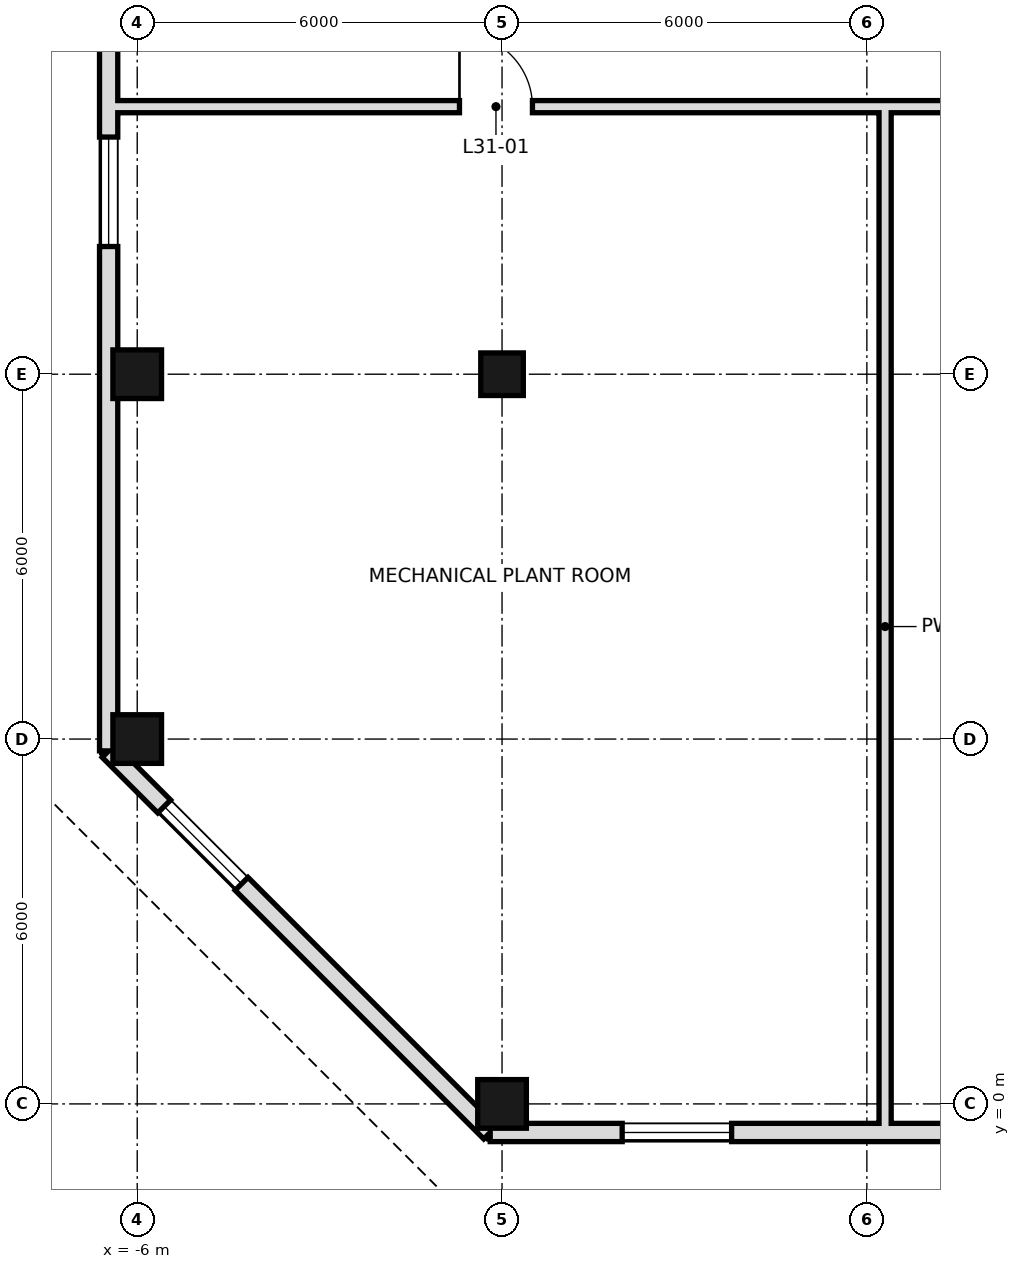
"""IFC4 building model, lengths in metres.
Left out: names, types, materials, properties, quantities, classifications, styles, units other than length and angle.
Written with IfcOpenShell. Run it as: python <this file> out.ifc"""

import sys

from ifc_helpers import new_model, si_unit, direction, frame, frame_2d, origin, origin_2d, place, context, subcontext, project, spatial, rectangle, hollow_rectangle, extrude, element, fill, save


model = new_model("IFC4")
c1 = context("Model", 3, precision=1e-05, world=origin(), true_north=direction((0.0, 1.0)))
c2 = subcontext(c1, "Body", "Model", "MODEL_VIEW")
j1 = project(units=[si_unit("LENGTHUNIT", "METRE"), si_unit("PLANEANGLEUNIT", "RADIAN")], contexts=[c1])
p1 = place(None, origin())
s1 = spatial("IfcSite", under=j1, at=p1, CompositionType="ELEMENT")
p2 = place(p1, origin())
s2 = spatial("IfcBuilding", under=s1, at=p2, CompositionType="ELEMENT")
p3 = place(p2, frame((0.0, 0.0, 138.4)))
s3 = spatial("IfcBuildingStorey", under=s2, at=p3, CompositionType="ELEMENT", Elevation=138.4)
for number, where, z_axis, x_axis in (
    (1, (-6.0, 6.0, 0.0), (0.0, 0.0, 1.0), (1.0, 0.0, 0.0)),
    (2, (-6.0, 12.0, 0.0), (0.0, 0.0, 1.0), (1.0, 0.0, 0.0)),
    (3, (0.0, 0.0, 0.0), (0.0, 0.0, 1.0), (1.0, 0.0, 0.0)),
):
    element("IfcColumn", number, at=place(p3, frame(where, z_axis=z_axis, x_axis=x_axis)), inside=s3, PredefinedType="COLUMN", context=c2, shape_type="SweptSolid", body=[
        extrude(hollow_rectangle(XDim=0.8, YDim=0.8, WallThickness=0.04, at=origin_2d()), origin(), (0.0, 0.0, 1.0), 5.4),
    ])
p4 = place(p3, frame((0.0, 12.0, 0.0), z_axis=(0.0, 0.0, 1.0), x_axis=(1.0, 0.0, 0.0)))
e4 = element("IfcColumn", 4, at=p4, inside=s3, PredefinedType="COLUMN", context=c2, shape_type="SweptSolid", body=[
    extrude(hollow_rectangle(XDim=0.7, YDim=0.7, WallThickness=0.036, at=origin_2d()), origin(), (0.0, 0.0, 1.0), 5.4),
])
p5 = place(p3, frame((-0.195, -0.47, 0.0), z_axis=(0.0, 0.0, 1.0), x_axis=(1.0, 0.0, 0.0)))
e5 = element("IfcWall", 5, at=p5, inside=s3, PredefinedType="SOLIDWALL", context=c2, shape_type="SweptSolid", body=[
    extrude(rectangle(XDim=54.389, YDim=0.3, at=frame_2d((27.195, 0.0))), origin(), (0.0, 0.0, 1.0), 5.22),
])
p6 = place(p5, frame((2.17, 0.0, 0.9)))
e6 = element("IfcOpeningElement", 6, at=p6, cuts=e5, PredefinedType="OPENING", context=c2, shape_type="SweptSolid", body=[
    extrude(rectangle(XDim=1.8, YDim=1.5, at=frame_2d((0.9, 0.75))), frame((0.0, 0.16, 0.0), z_axis=(0.0, -1.0, 0.0), x_axis=(1.0, 0.0, 0.0)), (0.0, 0.0, 1.0), 0.32),
])
p7 = place(p5, frame((14.295, 0.0, 0.9)))
e7 = element("IfcOpeningElement", 7, at=p7, cuts=e5, PredefinedType="OPENING", context=c2, shape_type="SweptSolid", body=[
    extrude(rectangle(XDim=1.8, YDim=1.5, at=frame_2d((0.9, 0.75))), frame((0.0, 0.16, 0.0), z_axis=(0.0, -1.0, 0.0), x_axis=(1.0, 0.0, 0.0)), (0.0, 0.0, 1.0), 0.32),
])
p8 = place(p5, frame((26.295, 0.0, 0.9)))
e8 = element("IfcOpeningElement", 8, at=p8, cuts=e5, PredefinedType="OPENING", context=c2, shape_type="SweptSolid", body=[
    extrude(rectangle(XDim=1.8, YDim=1.5, at=frame_2d((0.9, 0.75))), frame((0.0, 0.16, 0.0), z_axis=(0.0, -1.0, 0.0), x_axis=(1.0, 0.0, 0.0)), (0.0, 0.0, 1.0), 0.32),
])
p9 = place(p5, frame((38.295, 0.0, 0.9)))
e9 = element("IfcOpeningElement", 9, at=p9, cuts=e5, PredefinedType="OPENING", context=c2, shape_type="SweptSolid", body=[
    extrude(rectangle(XDim=1.8, YDim=1.5, at=frame_2d((0.9, 0.75))), frame((0.0, 0.16, 0.0), z_axis=(0.0, -1.0, 0.0), x_axis=(1.0, 0.0, 0.0)), (0.0, 0.0, 1.0), 0.32),
])
p10 = place(p5, frame((50.419, 0.0, 0.9)))
e10 = element("IfcOpeningElement", 10, at=p10, cuts=e5, PredefinedType="OPENING", context=c2, shape_type="SweptSolid", body=[
    extrude(rectangle(XDim=1.8, YDim=1.5, at=frame_2d((0.9, 0.75))), frame((0.0, 0.16, 0.0), z_axis=(0.0, -1.0, 0.0), x_axis=(1.0, 0.0, 0.0)), (0.0, 0.0, 1.0), 0.32),
])
p11 = place(p3, frame((-6.47, 42.195, 0.0), z_axis=(0.0, 0.0, 1.0), x_axis=(0.0, -1.0, 0.0)))
e11 = element("IfcWall", 11, at=p11, inside=s3, PredefinedType="SOLIDWALL", context=c2, shape_type="SweptSolid", body=[
    extrude(rectangle(XDim=36.389, YDim=0.3, at=frame_2d((18.195, 0.0))), origin(), (0.0, 0.0, 1.0), 5.22),
])
p12 = place(p11, frame((2.17, 0.0, 0.9)))
e12 = element("IfcOpeningElement", 12, at=p12, cuts=e11, PredefinedType="OPENING", context=c2, shape_type="SweptSolid", body=[
    extrude(rectangle(XDim=1.8, YDim=1.5, at=frame_2d((0.9, 0.75))), frame((0.0, 0.16, 0.0), z_axis=(0.0, -1.0, 0.0), x_axis=(1.0, 0.0, 0.0)), (0.0, 0.0, 1.0), 0.32),
])
p13 = place(p11, frame((14.295, 0.0, 0.9)))
e13 = element("IfcOpeningElement", 13, at=p13, cuts=e11, PredefinedType="OPENING", context=c2, shape_type="SweptSolid", body=[
    extrude(rectangle(XDim=1.8, YDim=1.5, at=frame_2d((0.9, 0.75))), frame((0.0, 0.16, 0.0), z_axis=(0.0, -1.0, 0.0), x_axis=(1.0, 0.0, 0.0)), (0.0, 0.0, 1.0), 0.32),
])
p14 = place(p11, frame((26.295, 0.0, 0.9)))
e14 = element("IfcOpeningElement", 14, at=p14, cuts=e11, PredefinedType="OPENING", context=c2, shape_type="SweptSolid", body=[
    extrude(rectangle(XDim=1.8, YDim=1.5, at=frame_2d((0.9, 0.75))), frame((0.0, 0.16, 0.0), z_axis=(0.0, -1.0, 0.0), x_axis=(1.0, 0.0, 0.0)), (0.0, 0.0, 1.0), 0.32),
])
p15 = place(p3, frame((-6.47, 5.805, 0.0), z_axis=(0.0, 0.0, 1.0), x_axis=(0.707106781187, -0.707106781187, 0.0)))
e15 = element("IfcWall", 15, at=p15, inside=s3, PredefinedType="SOLIDWALL", context=c2, shape_type="SweptSolid", body=[
    extrude(rectangle(XDim=8.875, YDim=0.3, at=frame_2d((4.438, 0.0))), origin(), (0.0, 0.0, 1.0), 5.22),
])
p16 = place(p15, frame((1.292, 0.0, 0.9)))
e16 = element("IfcOpeningElement", 16, at=p16, cuts=e15, PredefinedType="OPENING", context=c2, shape_type="SweptSolid", body=[
    extrude(rectangle(XDim=1.8, YDim=1.5, at=frame_2d((0.9, 0.75))), frame((0.0, 0.16, 0.0), z_axis=(0.0, -1.0, 0.0), x_axis=(1.0, 0.0, 0.0)), (0.0, 0.0, 1.0), 0.32),
])
p17 = place(p3, frame((6.3, -0.6, 0.0), z_axis=(0.0, 0.0, 1.0), x_axis=(0.0, 1.0, 0.0)))
e17 = element("IfcWall", 17, at=p17, inside=s3, PredefinedType="SOLIDWALL", context=c2, shape_type="SweptSolid", body=[
    extrude(rectangle(XDim=16.9, YDim=0.2, at=frame_2d((8.45, 0.0))), origin(), (0.0, 0.0, 1.0), 4.52),
])
p18 = place(p3, frame((-6.6, 16.4, 0.0), z_axis=(0.0, 0.0, 1.0), x_axis=(1.0, 0.0, 0.0)))
e18 = element("IfcWall", 18, at=p18, inside=s3, PredefinedType="SOLIDWALL", context=c2, shape_type="SweptSolid", body=[
    extrude(rectangle(XDim=67.2, YDim=0.2, at=frame_2d((33.6, 0.0))), origin(), (0.0, 0.0, 1.0), 4.52),
])
p19 = place(p18, frame((5.9, 0.0, 0.0)))
e19 = element("IfcOpeningElement", 19, at=p19, cuts=e18, PredefinedType="OPENING", context=c2, shape_type="SweptSolid", body=[
    extrude(rectangle(XDim=1.2, YDim=2.4, at=frame_2d((0.6, 1.2))), frame((0.0, 0.11, 0.0), z_axis=(0.0, -1.0, 0.0), x_axis=(1.0, 0.0, 0.0)), (0.0, 0.0, 1.0), 0.22),
])
p20 = place(p18, frame((18.7, 0.0, 0.0)))
e20 = element("IfcOpeningElement", 20, at=p20, cuts=e18, PredefinedType="OPENING", context=c2, shape_type="SweptSolid", body=[
    extrude(rectangle(XDim=1.2, YDim=2.4, at=frame_2d((0.6, 1.2))), frame((0.0, 0.11, 0.0), z_axis=(0.0, -1.0, 0.0), x_axis=(1.0, 0.0, 0.0)), (0.0, 0.0, 1.0), 0.22),
])
p21 = place(p18, frame((31.5, 0.0, 0.0)))
e21 = element("IfcOpeningElement", 21, at=p21, cuts=e18, PredefinedType="OPENING", context=c2, shape_type="SweptSolid", body=[
    extrude(rectangle(XDim=1.2, YDim=2.4, at=frame_2d((0.6, 1.2))), frame((0.0, 0.11, 0.0), z_axis=(0.0, -1.0, 0.0), x_axis=(1.0, 0.0, 0.0)), (0.0, 0.0, 1.0), 0.22),
])
p22 = place(p18, frame((44.3, 0.0, 0.0)))
e22 = element("IfcOpeningElement", 22, at=p22, cuts=e18, PredefinedType="OPENING", context=c2, shape_type="SweptSolid", body=[
    extrude(rectangle(XDim=1.2, YDim=2.4, at=frame_2d((0.6, 1.2))), frame((0.0, 0.11, 0.0), z_axis=(0.0, -1.0, 0.0), x_axis=(1.0, 0.0, 0.0)), (0.0, 0.0, 1.0), 0.22),
])
p23 = place(p18, frame((57.1, 0.0, 0.0)))
e23 = element("IfcOpeningElement", 23, at=p23, cuts=e18, PredefinedType="OPENING", context=c2, shape_type="SweptSolid", body=[
    extrude(rectangle(XDim=1.2, YDim=2.4, at=frame_2d((0.6, 1.2))), frame((0.0, 0.11, 0.0), z_axis=(0.0, -1.0, 0.0), x_axis=(1.0, 0.0, 0.0)), (0.0, 0.0, 1.0), 0.22),
])
p24 = place(p18, frame((65.1, 0.0, 0.0)))
e24 = element("IfcOpeningElement", 24, at=p24, cuts=e18, PredefinedType="OPENING", context=c2, shape_type="SweptSolid", body=[
    extrude(rectangle(XDim=1.0, YDim=2.4, at=frame_2d((0.5, 1.2))), frame((0.0, 0.11, 0.0), z_axis=(0.0, -1.0, 0.0), x_axis=(1.0, 0.0, 0.0)), (0.0, 0.0, 1.0), 0.22),
])
p25 = place(p6, origin())
e25 = element("IfcWindow", 25, at=p25, inside=s3, PartitioningType="SINGLE_PANEL", PredefinedType="WINDOW", context=c2, shape_type="SweptSolid", body=[
    extrude(rectangle(XDim=1.8, YDim=1.5, at=frame_2d((0.9, 0.75))), frame((0.0, 0.03, 0.0), z_axis=(0.0, -1.0, 0.0), x_axis=(1.0, 0.0, 0.0)), (0.0, 0.0, 1.0), 0.06),
])
fill(e6, e25)
p26 = place(p14, origin())
e26 = element("IfcWindow", 26, at=p26, inside=s3, PartitioningType="SINGLE_PANEL", PredefinedType="WINDOW", context=c2, shape_type="SweptSolid", body=[
    extrude(rectangle(XDim=1.8, YDim=1.5, at=frame_2d((0.9, 0.75))), frame((0.0, 0.03, 0.0), z_axis=(0.0, -1.0, 0.0), x_axis=(1.0, 0.0, 0.0)), (0.0, 0.0, 1.0), 0.06),
])
fill(e14, e26)
p27 = place(p16, origin())
e27 = element("IfcWindow", 27, at=p27, inside=s3, PartitioningType="SINGLE_PANEL", PredefinedType="WINDOW", context=c2, shape_type="SweptSolid", body=[
    extrude(rectangle(XDim=1.8, YDim=1.5, at=frame_2d((0.9, 0.75))), frame((0.0, 0.03, 0.0), z_axis=(0.0, -1.0, 0.0), x_axis=(1.0, 0.0, 0.0)), (0.0, 0.0, 1.0), 0.06),
])
fill(e16, e27)
p28 = place(p19, origin())
e28 = element("IfcDoor", 28, at=p28, inside=s3, OperationType="SINGLE_SWING_LEFT", PredefinedType="DOOR", context=c2, shape_type="SweptSolid", body=[
    extrude(rectangle(XDim=1.2, YDim=2.4, at=frame_2d((0.6, 1.2))), frame((0.0, 0.025, 0.0), z_axis=(0.0, -1.0, 0.0), x_axis=(1.0, 0.0, 0.0)), (0.0, 0.0, 1.0), 0.05),
])
fill(e19, e28)
save(model, sys.argv[1])
